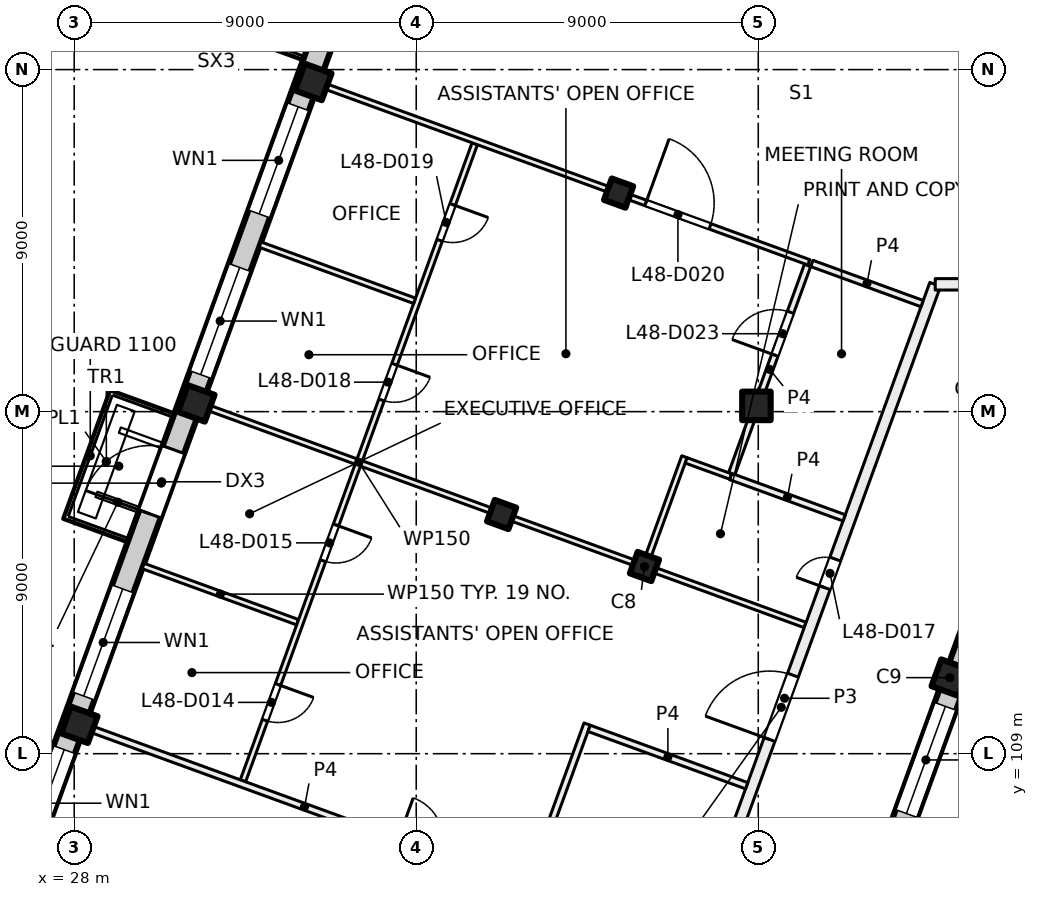
"""IFC4 building model, lengths in metres.
Left out: names, types, materials, properties, quantities, classifications, styles, units other than length and angle.
Written with IfcOpenShell. Run it as: python <this file> out.ifc"""

import sys

from ifc_helpers import new_model, si_unit, direction, frame, frame_2d, origin, origin_2d, place, context, subcontext, project, spatial, rectangle, extrude, element, fill, save


model = new_model("IFC4")
c1 = context("Model", 3, precision=1e-05, world=origin(), true_north=direction((0.0, 1.0)))
c2 = subcontext(c1, "Body", "Model", "MODEL_VIEW")
j1 = project(units=[si_unit("LENGTHUNIT", "METRE"), si_unit("PLANEANGLEUNIT", "RADIAN")], contexts=[c1])
p1 = place(None, origin())
s1 = spatial("IfcSite", under=j1, at=p1, CompositionType="ELEMENT")
p2 = place(p1, origin())
s2 = spatial("IfcBuilding", under=s1, at=p2, CompositionType="ELEMENT")
p3 = place(p2, frame((0.0, 0.0, 204.0)))
s3 = spatial("IfcBuildingStorey", under=s2, at=p3, CompositionType="ELEMENT", Elevation=204.0)
p4 = place(p3, frame((45.952, 118.152, 0.0), z_axis=(0.0, 0.0, 1.0), x_axis=(1.0, 0.0, 0.0)))
e1 = element("IfcColumn", 1, at=p4, inside=s3, PredefinedType="COLUMN", context=c2, shape_type="SweptSolid", body=[
    extrude(rectangle(XDim=0.75, YDim=0.75, at=origin_2d()), origin(), (0.0, 0.0, 1.0), 4.0),
])
for number, where, z_axis, x_axis in (
    (2, (43.006, 113.925, 0.0), (0.0, 0.0, 1.0), (-0.342, -0.94, 0.0)),
    (3, (42.325, 123.751, 0.0), (0.0, 0.0, 1.0), (-0.342, -0.94, 0.0)),
    (4, (39.247, 115.293, 0.0), (0.0, 0.0, 1.0), (-0.342, -0.94, 0.0)),
):
    element("IfcColumn", number, at=place(p3, frame(where, z_axis=z_axis, x_axis=x_axis)), inside=s3, PredefinedType="COLUMN", context=c2, shape_type="SweptSolid", body=[
        extrude(rectangle(XDim=0.6, YDim=0.6, at=origin_2d()), origin(), (0.0, 0.0, 1.0), 4.0),
    ])
for number, where, z_axis, x_axis in (
    (5, (51.04, 111.001, 0.0), (0.0, 0.0, 1.0), (-0.342, -0.94, 0.0)),
    (6, (34.291, 126.675, 0.0), (0.0, 0.0, 1.0), (-0.342, -0.94, 0.0)),
    (7, (31.212, 118.218, 0.0), (0.0, 0.0, 1.0), (-0.342, -0.94, 0.0)),
    (8, (28.134, 109.76, 0.0), (0.0, 0.0, 1.0), (-0.342, -0.94, 0.0)),
):
    element("IfcColumn", number, at=place(p3, frame(where, z_axis=z_axis, x_axis=x_axis)), inside=s3, PredefinedType="COLUMN", context=c2, shape_type="SweptSolid", body=[
        extrude(rectangle(XDim=0.75, YDim=0.75, at=origin_2d()), origin(), (0.0, 0.0, 1.0), 4.0),
    ])
p5 = place(p3, frame((52.212, 113.783, 0.0), z_axis=(0.0, 0.0, 1.0), x_axis=(-0.34202521188, -0.939690775968, 0.0)))
e9 = element("IfcWall", 9, at=p5, inside=s3, PredefinedType="SOLIDWALL", context=c2, shape_type="SweptSolid", body=[
    extrude(rectangle(XDim=21.745, YDim=0.6, at=frame_2d((10.873, 0.0))), origin(), (0.0, 0.0, 1.0), 3.625),
])
p6 = place(p5, frame((3.765, 0.0, 0.9)))
e10 = element("IfcOpeningElement", 10, at=p6, cuts=e9, PredefinedType="OPENING", context=c2, shape_type="SweptSolid", body=[
    extrude(rectangle(XDim=3.0, YDim=2.4, at=frame_2d((1.5, 1.2))), frame((0.0, 0.31, 0.0), z_axis=(0.0, -1.0, 0.0), x_axis=(1.0, 0.0, 0.0)), (0.0, 0.0, 1.0), 0.62),
])
p7 = place(p5, frame((8.265, 0.0, 0.9)))
e11 = element("IfcOpeningElement", 11, at=p7, cuts=e9, PredefinedType="OPENING", context=c2, shape_type="SweptSolid", body=[
    extrude(rectangle(XDim=3.0, YDim=2.4, at=frame_2d((1.5, 1.2))), frame((0.0, 0.31, 0.0), z_axis=(0.0, -1.0, 0.0), x_axis=(1.0, 0.0, 0.0)), (0.0, 0.0, 1.0), 0.62),
])
p8 = place(p5, frame((12.765, 0.0, 0.9)))
e12 = element("IfcOpeningElement", 12, at=p8, cuts=e9, PredefinedType="OPENING", context=c2, shape_type="SweptSolid", body=[
    extrude(rectangle(XDim=3.0, YDim=2.4, at=frame_2d((1.5, 1.2))), frame((0.0, 0.31, 0.0), z_axis=(0.0, -1.0, 0.0), x_axis=(1.0, 0.0, 0.0)), (0.0, 0.0, 1.0), 0.62),
])
p9 = place(p5, frame((17.265, 0.0, 0.9)))
e13 = element("IfcOpeningElement", 13, at=p9, cuts=e9, PredefinedType="OPENING", context=c2, shape_type="SweptSolid", body=[
    extrude(rectangle(XDim=3.0, YDim=2.4, at=frame_2d((1.5, 1.2))), frame((0.0, 0.31, 0.0), z_axis=(0.0, -1.0, 0.0), x_axis=(1.0, 0.0, 0.0)), (0.0, 0.0, 1.0), 0.62),
])
p10 = place(p3, frame((24.666, 100.669, 0.0), z_axis=(0.0, 0.0, 1.0), x_axis=(0.34201964167, 0.939692803373, 0.0)))
e14 = element("IfcWall", 14, at=p10, inside=s3, PredefinedType="SOLIDWALL", context=c2, shape_type="SweptSolid", body=[
    extrude(rectangle(XDim=32.884, YDim=0.6, at=frame_2d((16.442, 0.0))), origin(), (0.0, 0.0, 1.0), 3.625),
])
p11 = place(p10, frame((1.48, 0.0, 0.9)))
e15 = element("IfcOpeningElement", 15, at=p11, cuts=e14, PredefinedType="OPENING", context=c2, shape_type="SweptSolid", body=[
    extrude(rectangle(XDim=3.0, YDim=2.4, at=frame_2d((1.5, 1.2))), frame((0.0, 0.31, 0.0), z_axis=(0.0, -1.0, 0.0), x_axis=(1.0, 0.0, 0.0)), (0.0, 0.0, 1.0), 0.62),
])
p12 = place(p10, frame((5.98, 0.0, 0.9)))
e16 = element("IfcOpeningElement", 16, at=p12, cuts=e14, PredefinedType="OPENING", context=c2, shape_type="SweptSolid", body=[
    extrude(rectangle(XDim=3.0, YDim=2.4, at=frame_2d((1.5, 1.2))), frame((0.0, 0.31, 0.0), z_axis=(0.0, -1.0, 0.0), x_axis=(1.0, 0.0, 0.0)), (0.0, 0.0, 1.0), 0.62),
])
p13 = place(p10, frame((10.48, 0.0, 0.9)))
e17 = element("IfcOpeningElement", 17, at=p13, cuts=e14, PredefinedType="OPENING", context=c2, shape_type="SweptSolid", body=[
    extrude(rectangle(XDim=3.0, YDim=2.4, at=frame_2d((1.5, 1.2))), frame((0.0, 0.31, 0.0), z_axis=(0.0, -1.0, 0.0), x_axis=(1.0, 0.0, 0.0)), (0.0, 0.0, 1.0), 0.62),
])
p14 = place(p10, frame((15.58, 0.0, 0.0)))
e18 = element("IfcOpeningElement", 18, at=p14, cuts=e14, PredefinedType="OPENING", context=c2, shape_type="SweptSolid", body=[
    extrude(rectangle(XDim=1.8, YDim=2.4, at=frame_2d((0.9, 1.2))), frame((0.0, 0.31, 0.0), z_axis=(0.0, -1.0, 0.0), x_axis=(1.0, 0.0, 0.0)), (0.0, 0.0, 1.0), 0.62),
])
p15 = place(p10, frame((19.48, 0.0, 0.9)))
e19 = element("IfcOpeningElement", 19, at=p15, cuts=e14, PredefinedType="OPENING", context=c2, shape_type="SweptSolid", body=[
    extrude(rectangle(XDim=3.0, YDim=2.4, at=frame_2d((1.5, 1.2))), frame((0.0, 0.31, 0.0), z_axis=(0.0, -1.0, 0.0), x_axis=(1.0, 0.0, 0.0)), (0.0, 0.0, 1.0), 0.62),
])
p16 = place(p10, frame((23.98, 0.0, 0.9)))
e20 = element("IfcOpeningElement", 20, at=p16, cuts=e14, PredefinedType="OPENING", context=c2, shape_type="SweptSolid", body=[
    extrude(rectangle(XDim=3.0, YDim=2.4, at=frame_2d((1.5, 1.2))), frame((0.0, 0.31, 0.0), z_axis=(0.0, -1.0, 0.0), x_axis=(1.0, 0.0, 0.0)), (0.0, 0.0, 1.0), 0.62),
])
p17 = place(p10, frame((29.08, 0.0, 0.0)))
e21 = element("IfcOpeningElement", 21, at=p17, cuts=e14, PredefinedType="OPENING", context=c2, shape_type="SweptSolid", body=[
    extrude(rectangle(XDim=1.8, YDim=2.4, at=frame_2d((0.9, 1.2))), frame((0.0, 0.31, 0.0), z_axis=(0.0, -1.0, 0.0), x_axis=(1.0, 0.0, 0.0)), (0.0, 0.0, 1.0), 0.62),
])
p18 = place(p3, frame((29.814, 113.938, 0.0), z_axis=(0.0, 0.0, 1.0), x_axis=(0.93973078783, -0.341915262023, 0.0)))
e22 = element("IfcWall", 22, at=p18, inside=s3, PredefinedType="PARTITIONING", context=c2, shape_type="SweptSolid", body=[
    extrude(rectangle(XDim=4.326, YDim=0.15, at=frame_2d((2.163, 0.0))), origin(), (0.0, 0.0, 1.0), 3.625),
])
p19 = place(p3, frame((31.353, 118.166, 0.0), z_axis=(0.0, 0.0, 1.0), x_axis=(0.939695108427, -0.342013308511, 0.0)))
e23 = element("IfcWall", 23, at=p19, inside=s3, PredefinedType="PARTITIONING", context=c2, shape_type="SweptSolid", body=[
    extrude(rectangle(XDim=16.9, YDim=0.15, at=frame_2d((8.45, 0.0))), origin(), (0.0, 0.0, 1.0), 3.625),
])
p20 = place(p3, frame((38.54, 125.049, 0.0), z_axis=(0.0, 0.0, 1.0), x_axis=(-0.341960632782, -0.939714278719, 0.0)))
e24 = element("IfcWall", 24, at=p20, inside=s3, PredefinedType="PARTITIONING", context=c2, shape_type="SweptSolid", body=[
    extrude(rectangle(XDim=17.839, YDim=0.15, at=frame_2d((8.919, 0.0))), origin(), (0.0, 0.0, 1.0), 3.625),
])
p21 = place(p20, frame((15.142, 0.0, 0.0)))
e25 = element("IfcOpeningElement", 25, at=p21, cuts=e24, PredefinedType="OPENING", context=c2, shape_type="SweptSolid", body=[
    extrude(rectangle(XDim=1.0, YDim=2.1, at=frame_2d((0.5, 1.05))), frame((0.0, 0.085, 0.0), z_axis=(0.0, -1.0, 0.0), x_axis=(1.0, 0.0, 0.0)), (0.0, 0.0, 1.0), 0.17),
])
p22 = place(p20, frame((10.675, 0.0, 0.0)))
e26 = element("IfcOpeningElement", 26, at=p22, cuts=e24, PredefinedType="OPENING", context=c2, shape_type="SweptSolid", body=[
    extrude(rectangle(XDim=1.0, YDim=2.1, at=frame_2d((0.5, 1.05))), frame((0.0, 0.085, 0.0), z_axis=(0.0, -1.0, 0.0), x_axis=(1.0, 0.0, 0.0)), (0.0, 0.0, 1.0), 0.17),
])
p23 = place(p20, frame((6.176, 0.0, 0.0)))
e27 = element("IfcOpeningElement", 27, at=p23, cuts=e24, PredefinedType="OPENING", context=c2, shape_type="SweptSolid", body=[
    extrude(rectangle(XDim=1.0, YDim=2.1, at=frame_2d((0.5, 1.05))), frame((0.0, 0.085, 0.0), z_axis=(0.0, -1.0, 0.0), x_axis=(1.0, 0.0, 0.0)), (0.0, 0.0, 1.0), 0.17),
])
p24 = place(p20, frame((1.703, 0.0, 0.0)))
e28 = element("IfcOpeningElement", 28, at=p24, cuts=e24, PredefinedType="OPENING", context=c2, shape_type="SweptSolid", body=[
    extrude(rectangle(XDim=1.0, YDim=2.1, at=frame_2d((0.5, 1.05))), frame((0.0, 0.085, 0.0), z_axis=(0.0, -1.0, 0.0), x_axis=(1.0, 0.0, 0.0)), (0.0, 0.0, 1.0), 0.17),
])
p25 = place(p3, frame((32.892, 122.395, 0.0), z_axis=(0.0, 0.0, 1.0), x_axis=(0.93973078783, -0.341915262023, 0.0)))
e29 = element("IfcWall", 29, at=p25, inside=s3, PredefinedType="PARTITIONING", context=c2, shape_type="SweptSolid", body=[
    extrude(rectangle(XDim=4.326, YDim=0.15, at=frame_2d((2.163, 0.0))), origin(), (0.0, 0.0, 1.0), 3.625),
])
p26 = place(p3, frame((34.431, 126.624, 0.0), z_axis=(0.0, 0.0, 1.0), x_axis=(0.939689004313, -0.34203007934, 0.0)))
e30 = element("IfcWall", 30, at=p26, inside=s3, PredefinedType="PARTITIONING", context=c2, shape_type="SweptSolid", body=[
    extrude(rectangle(XDim=13.727, YDim=0.15, at=frame_2d((6.864, 0.0))), origin(), (0.0, 0.0, 1.0), 3.625),
])
p27 = place(p26, frame((9.162, 0.0, 0.0)))
e31 = element("IfcOpeningElement", 31, at=p27, cuts=e30, PredefinedType="OPENING", context=c2, shape_type="SweptSolid", body=[
    extrude(rectangle(XDim=1.8, YDim=2.1, at=frame_2d((0.9, 1.05))), frame((0.0, 0.085, 0.0), z_axis=(0.0, -1.0, 0.0), x_axis=(1.0, 0.0, 0.0)), (0.0, 0.0, 1.0), 0.17),
])
p28 = place(p3, frame((38.418, 101.321, 0.0), z_axis=(0.0, 0.0, 1.0), x_axis=(0.342082778631, 0.939669821035, 0.0)))
e32 = element("IfcWall", 32, at=p28, inside=s3, PredefinedType="PARTITIONING", context=c2, shape_type="SweptSolid", body=[
    extrude(rectangle(XDim=9.001, YDim=0.175, at=frame_2d((4.5, 0.0))), origin(), (0.0, 0.0, 1.0), 3.625),
])
p29 = place(p3, frame((28.275, 109.709, 0.0), z_axis=(0.0, 0.0, 1.0), x_axis=(0.939707717516, -0.341978662553, 0.0)))
e33 = element("IfcWall", 33, at=p29, inside=s3, PredefinedType="PARTITIONING", context=c2, shape_type="SweptSolid", body=[
    extrude(rectangle(XDim=12.313, YDim=0.175, at=frame_2d((6.157, 0.0))), origin(), (0.0, 0.0, 1.0), 3.625),
])
p30 = place(p29, frame((8.765, 0.0, 0.0)))
e34 = element("IfcOpeningElement", 34, at=p30, cuts=e33, PredefinedType="OPENING", context=c2, shape_type="SweptSolid", body=[
    extrude(rectangle(XDim=1.2, YDim=2.1, at=frame_2d((0.6, 1.05))), frame((0.0, 0.097, 0.0), z_axis=(0.0, -1.0, 0.0), x_axis=(1.0, 0.0, 0.0)), (0.0, 0.0, 1.0), 0.195),
])
p31 = place(p3, frame((42.728, 99.567, 0.0), z_axis=(0.0, 0.0, 1.0), x_axis=(0.342016197204, 0.939694057048, 0.0)))
e35 = element("IfcWall", 35, at=p31, inside=s3, PredefinedType="PARTITIONING", context=c2, shape_type="SweptSolid", body=[
    extrude(rectangle(XDim=23.18, YDim=0.3, at=frame_2d((11.59, 0.0))), origin(), (0.0, 0.0, 1.0), 3.625),
])
p32 = place(p31, frame((3.987, 0.0, 0.0)))
e36 = element("IfcOpeningElement", 36, at=p32, cuts=e35, PredefinedType="OPENING", context=c2, shape_type="SweptSolid", body=[
    extrude(rectangle(XDim=1.2, YDim=2.1, at=frame_2d((0.6, 1.05))), frame((0.0, 0.16, 0.0), z_axis=(0.0, -1.0, 0.0), x_axis=(1.0, 0.0, 0.0)), (0.0, 0.0, 1.0), 0.32),
])
p33 = place(p31, frame((10.437, 0.0, 0.0)))
e37 = element("IfcOpeningElement", 37, at=p33, cuts=e35, PredefinedType="OPENING", context=c2, shape_type="SweptSolid", body=[
    extrude(rectangle(XDim=1.8, YDim=2.1, at=frame_2d((0.9, 1.05))), frame((0.0, 0.16, 0.0), z_axis=(0.0, -1.0, 0.0), x_axis=(1.0, 0.0, 0.0)), (0.0, 0.0, 1.0), 0.32),
])
p34 = place(p31, frame((14.687, 0.0, 0.0)))
e38 = element("IfcOpeningElement", 38, at=p34, cuts=e35, PredefinedType="OPENING", context=c2, shape_type="SweptSolid", body=[
    extrude(rectangle(XDim=0.8, YDim=2.1, at=frame_2d((0.4, 1.05))), frame((0.0, 0.16, 0.0), z_axis=(0.0, -1.0, 0.0), x_axis=(1.0, 0.0, 0.0)), (0.0, 0.0, 1.0), 0.32),
])
p35 = place(p3, frame((44.058, 116.814, 0.0), z_axis=(0.0, 0.0, 1.0), x_axis=(-0.342063238742, -0.939676934218, 0.0)))
e39 = element("IfcWall", 39, at=p35, inside=s3, PredefinedType="PARTITIONING", context=c2, shape_type="SweptSolid", body=[
    extrude(rectangle(XDim=3.0, YDim=0.15, at=frame_2d((1.5, 0.0))), origin(), (0.0, 0.0, 1.0), 3.625),
])
p36 = place(p3, frame((45.275, 116.292, 0.0), z_axis=(0.0, 0.0, 1.0), x_axis=(-0.93991332754, 0.341413146661, 0.0)))
e40 = element("IfcWall", 40, at=p36, inside=s3, PredefinedType="PARTITIONING", context=c2, shape_type="SweptSolid", body=[
    extrude(rectangle(XDim=1.248, YDim=0.15, at=frame_2d((0.624, 0.0))), origin(), (0.0, 0.0, 1.0), 3.625),
])
p37 = place(p3, frame((45.275, 116.292, 0.0), z_axis=(0.0, 0.0, 1.0), x_axis=(0.939649736865, -0.342137942956, 0.0)))
e41 = element("IfcWall", 41, at=p37, inside=s3, PredefinedType="PARTITIONING", context=c2, shape_type="SweptSolid", body=[
    extrude(rectangle(XDim=3.177, YDim=0.175, at=frame_2d((1.588, 0.0))), origin(), (0.0, 0.0, 1.0), 3.625),
])
p38 = place(p3, frame((45.695, 108.157, 0.0), z_axis=(0.0, 0.0, 1.0), x_axis=(-0.939620446327, 0.342218375959, 0.0)))
e42 = element("IfcWall", 42, at=p38, inside=s3, PredefinedType="PARTITIONING", context=c2, shape_type="SweptSolid", body=[
    extrude(rectangle(XDim=4.412, YDim=0.175, at=frame_2d((2.206, 0.0))), origin(), (0.0, 0.0, 1.0), 3.625),
])
p39 = place(p3, frame((45.305, 116.374, 0.0), z_axis=(0.0, 0.0, 1.0), x_axis=(0.341998803079, 0.939700387726, 0.0)))
e43 = element("IfcWall", 43, at=p39, inside=s3, PredefinedType="PARTITIONING", context=c2, shape_type="SweptSolid", body=[
    extrude(rectangle(XDim=5.825, YDim=0.175, at=frame_2d((2.913, 0.0))), origin(), (0.0, 0.0, 1.0), 3.625),
])
p40 = place(p39, frame((3.312, 0.0, 0.0)))
e44 = element("IfcOpeningElement", 44, at=p40, cuts=e43, PredefinedType="OPENING", context=c2, shape_type="SweptSolid", body=[
    extrude(rectangle(XDim=1.2, YDim=2.1, at=frame_2d((0.6, 1.05))), frame((0.0, 0.097, 0.0), z_axis=(0.0, -1.0, 0.0), x_axis=(1.0, 0.0, 0.0)), (0.0, 0.0, 1.0), 0.195),
])
p41 = place(p3, frame((50.312, 120.843, 0.0), z_axis=(0.0, 0.0, 1.0), x_axis=(-0.939666459913, 0.342092011182, 0.0)))
e45 = element("IfcWall", 45, at=p41, inside=s3, PredefinedType="PARTITIONING", context=c2, shape_type="SweptSolid", body=[
    extrude(rectangle(XDim=3.089, YDim=0.175, at=frame_2d((1.545, 0.0))), origin(), (0.0, 0.0, 1.0), 3.625),
])
p42 = place(p3, frame((50.657, 121.35, 0.0), z_axis=(0.0, 0.0, 1.0), x_axis=(1.0, 0.0, 0.0)))
e46 = element("IfcWall", 46, at=p42, inside=s3, PredefinedType="PARTITIONING", context=c2, shape_type="SweptSolid", body=[
    extrude(rectangle(XDim=35.096, YDim=0.3, at=frame_2d((17.548, 0.0))), origin(), (0.0, 0.0, 1.0), 3.625),
])
p43 = place(p42, frame((21.093, 0.0, 0.0)))
e47 = element("IfcOpeningElement", 47, at=p43, cuts=e46, PredefinedType="OPENING", context=c2, shape_type="SweptSolid", body=[
    extrude(rectangle(XDim=1.0, YDim=2.1, at=frame_2d((0.5, 1.05))), frame((0.0, 0.16, 0.0), z_axis=(0.0, -1.0, 0.0), x_axis=(1.0, 0.0, 0.0)), (0.0, 0.0, 1.0), 0.32),
])
p44 = place(p42, frame((29.693, 0.0, 0.0)))
e48 = element("IfcOpeningElement", 48, at=p44, cuts=e46, PredefinedType="OPENING", context=c2, shape_type="SweptSolid", body=[
    extrude(rectangle(XDim=1.8, YDim=2.1, at=frame_2d((0.9, 1.05))), frame((0.0, 0.16, 0.0), z_axis=(0.0, -1.0, 0.0), x_axis=(1.0, 0.0, 0.0)), (0.0, 0.0, 1.0), 0.32),
])
p45 = place(p42, frame((9.443, 0.0, 0.0)))
e49 = element("IfcOpeningElement", 49, at=p45, cuts=e46, PredefinedType="OPENING", context=c2, shape_type="SweptSolid", body=[
    extrude(rectangle(XDim=1.8, YDim=2.1, at=frame_2d((0.9, 1.05))), frame((0.0, 0.16, 0.0), z_axis=(0.0, -1.0, 0.0), x_axis=(1.0, 0.0, 0.0)), (0.0, 0.0, 1.0), 0.32),
])
p46 = place(p42, frame((0.896, 0.0, 0.0)))
e50 = element("IfcOpeningElement", 50, at=p46, cuts=e46, PredefinedType="OPENING", context=c2, shape_type="SweptSolid", body=[
    extrude(rectangle(XDim=1.8, YDim=2.1, at=frame_2d((0.9, 1.05))), frame((0.0, 0.16, 0.0), z_axis=(0.0, -1.0, 0.0), x_axis=(1.0, 0.0, 0.0)), (0.0, 0.0, 1.0), 0.32),
])
p47 = place(p6, origin())
e51 = element("IfcWindow", 51, at=p47, inside=s3, PartitioningType="SINGLE_PANEL", PredefinedType="WINDOW", context=c2, shape_type="SweptSolid", body=[
    extrude(rectangle(XDim=3.0, YDim=2.4, at=frame_2d((1.5, 1.2))), frame((0.0, 0.03, 0.0), z_axis=(0.0, -1.0, 0.0), x_axis=(1.0, 0.0, 0.0)), (0.0, 0.0, 1.0), 0.06),
])
fill(e10, e51)
p48 = place(p12, origin())
e52 = element("IfcWindow", 52, at=p48, inside=s3, PartitioningType="SINGLE_PANEL", PredefinedType="WINDOW", context=c2, shape_type="SweptSolid", body=[
    extrude(rectangle(XDim=3.0, YDim=2.4, at=frame_2d((1.5, 1.2))), frame((0.0, 0.03, 0.0), z_axis=(0.0, -1.0, 0.0), x_axis=(1.0, 0.0, 0.0)), (0.0, 0.0, 1.0), 0.06),
])
fill(e16, e52)
p49 = place(p13, origin())
e53 = element("IfcWindow", 53, at=p49, inside=s3, PartitioningType="SINGLE_PANEL", PredefinedType="WINDOW", context=c2, shape_type="SweptSolid", body=[
    extrude(rectangle(XDim=3.0, YDim=2.4, at=frame_2d((1.5, 1.2))), frame((0.0, 0.03, 0.0), z_axis=(0.0, -1.0, 0.0), x_axis=(1.0, 0.0, 0.0)), (0.0, 0.0, 1.0), 0.06),
])
fill(e17, e53)
p50 = place(p14, origin())
e54 = element("IfcDoor", 54, at=p50, inside=s3, OperationType="DOUBLE_DOOR_SINGLE_SWING", PredefinedType="DOOR", context=c2, shape_type="SweptSolid", body=[
    extrude(rectangle(XDim=1.8, YDim=2.4, at=frame_2d((0.9, 1.2))), frame((0.0, 0.025, 0.0), z_axis=(0.0, -1.0, 0.0), x_axis=(1.0, 0.0, 0.0)), (0.0, 0.0, 1.0), 0.05),
])
fill(e18, e54)
p51 = place(p15, origin())
e55 = element("IfcWindow", 55, at=p51, inside=s3, PartitioningType="SINGLE_PANEL", PredefinedType="WINDOW", context=c2, shape_type="SweptSolid", body=[
    extrude(rectangle(XDim=3.0, YDim=2.4, at=frame_2d((1.5, 1.2))), frame((0.0, 0.03, 0.0), z_axis=(0.0, -1.0, 0.0), x_axis=(1.0, 0.0, 0.0)), (0.0, 0.0, 1.0), 0.06),
])
fill(e19, e55)
p52 = place(p16, origin())
e56 = element("IfcWindow", 56, at=p52, inside=s3, PartitioningType="SINGLE_PANEL", PredefinedType="WINDOW", context=c2, shape_type="SweptSolid", body=[
    extrude(rectangle(XDim=3.0, YDim=2.4, at=frame_2d((1.5, 1.2))), frame((0.0, 0.03, 0.0), z_axis=(0.0, -1.0, 0.0), x_axis=(1.0, 0.0, 0.0)), (0.0, 0.0, 1.0), 0.06),
])
fill(e20, e56)
p53 = place(p21, origin())
e57 = element("IfcDoor", 57, at=p53, inside=s3, OperationType="SINGLE_SWING_LEFT", PredefinedType="DOOR", context=c2, shape_type="SweptSolid", body=[
    extrude(rectangle(XDim=1.0, YDim=2.1, at=frame_2d((0.5, 1.05))), frame((0.0, 0.025, 0.0), z_axis=(0.0, -1.0, 0.0), x_axis=(1.0, 0.0, 0.0)), (0.0, 0.0, 1.0), 0.05),
])
fill(e25, e57)
p54 = place(p22, origin())
e58 = element("IfcDoor", 58, at=p54, inside=s3, OperationType="SINGLE_SWING_LEFT", PredefinedType="DOOR", context=c2, shape_type="SweptSolid", body=[
    extrude(rectangle(XDim=1.0, YDim=2.1, at=frame_2d((0.5, 1.05))), frame((0.0, 0.025, 0.0), z_axis=(0.0, -1.0, 0.0), x_axis=(1.0, 0.0, 0.0)), (0.0, 0.0, 1.0), 0.05),
])
fill(e26, e58)
p55 = place(p33, origin())
e59 = element("IfcDoor", 59, at=p55, inside=s3, OperationType="DOUBLE_DOOR_SINGLE_SWING", PredefinedType="DOOR", context=c2, shape_type="SweptSolid", body=[
    extrude(rectangle(XDim=1.8, YDim=2.1, at=frame_2d((0.9, 1.05))), frame((0.0, 0.025, 0.0), z_axis=(0.0, -1.0, 0.0), x_axis=(1.0, 0.0, 0.0)), (0.0, 0.0, 1.0), 0.05),
])
fill(e37, e59)
p56 = place(p34, origin())
e60 = element("IfcDoor", 60, at=p56, inside=s3, OperationType="SINGLE_SWING_LEFT", PredefinedType="DOOR", context=c2, shape_type="SweptSolid", body=[
    extrude(rectangle(XDim=0.8, YDim=2.1, at=frame_2d((0.4, 1.05))), frame((0.0, 0.025, 0.0), z_axis=(0.0, -1.0, 0.0), x_axis=(1.0, 0.0, 0.0)), (0.0, 0.0, 1.0), 0.05),
])
fill(e38, e60)
p57 = place(p23, origin())
e61 = element("IfcDoor", 61, at=p57, inside=s3, OperationType="SINGLE_SWING_LEFT", PredefinedType="DOOR", context=c2, shape_type="SweptSolid", body=[
    extrude(rectangle(XDim=1.0, YDim=2.1, at=frame_2d((0.5, 1.05))), frame((0.0, 0.025, 0.0), z_axis=(0.0, -1.0, 0.0), x_axis=(1.0, 0.0, 0.0)), (0.0, 0.0, 1.0), 0.05),
])
fill(e27, e61)
p58 = place(p24, origin())
e62 = element("IfcDoor", 62, at=p58, inside=s3, OperationType="SINGLE_SWING_LEFT", PredefinedType="DOOR", context=c2, shape_type="SweptSolid", body=[
    extrude(rectangle(XDim=1.0, YDim=2.1, at=frame_2d((0.5, 1.05))), frame((0.0, 0.025, 0.0), z_axis=(0.0, -1.0, 0.0), x_axis=(1.0, 0.0, 0.0)), (0.0, 0.0, 1.0), 0.05),
])
fill(e28, e62)
p59 = place(p27, origin())
e63 = element("IfcDoor", 63, at=p59, inside=s3, OperationType="DOUBLE_DOOR_SINGLE_SWING", PredefinedType="DOOR", context=c2, shape_type="SweptSolid", body=[
    extrude(rectangle(XDim=1.8, YDim=2.1, at=frame_2d((0.9, 1.05))), frame((0.0, 0.025, 0.0), z_axis=(0.0, -1.0, 0.0), x_axis=(1.0, 0.0, 0.0)), (0.0, 0.0, 1.0), 0.05),
])
fill(e31, e63)
p60 = place(p40, origin())
e64 = element("IfcDoor", 64, at=p60, inside=s3, OperationType="DOUBLE_DOOR_SINGLE_SWING", PredefinedType="DOOR", context=c2, shape_type="SweptSolid", body=[
    extrude(rectangle(XDim=1.2, YDim=2.1, at=frame_2d((0.6, 1.05))), frame((0.0, 0.025, 0.0), z_axis=(0.0, -1.0, 0.0), x_axis=(1.0, 0.0, 0.0)), (0.0, 0.0, 1.0), 0.05),
])
fill(e44, e64)
save(model, sys.argv[1])
